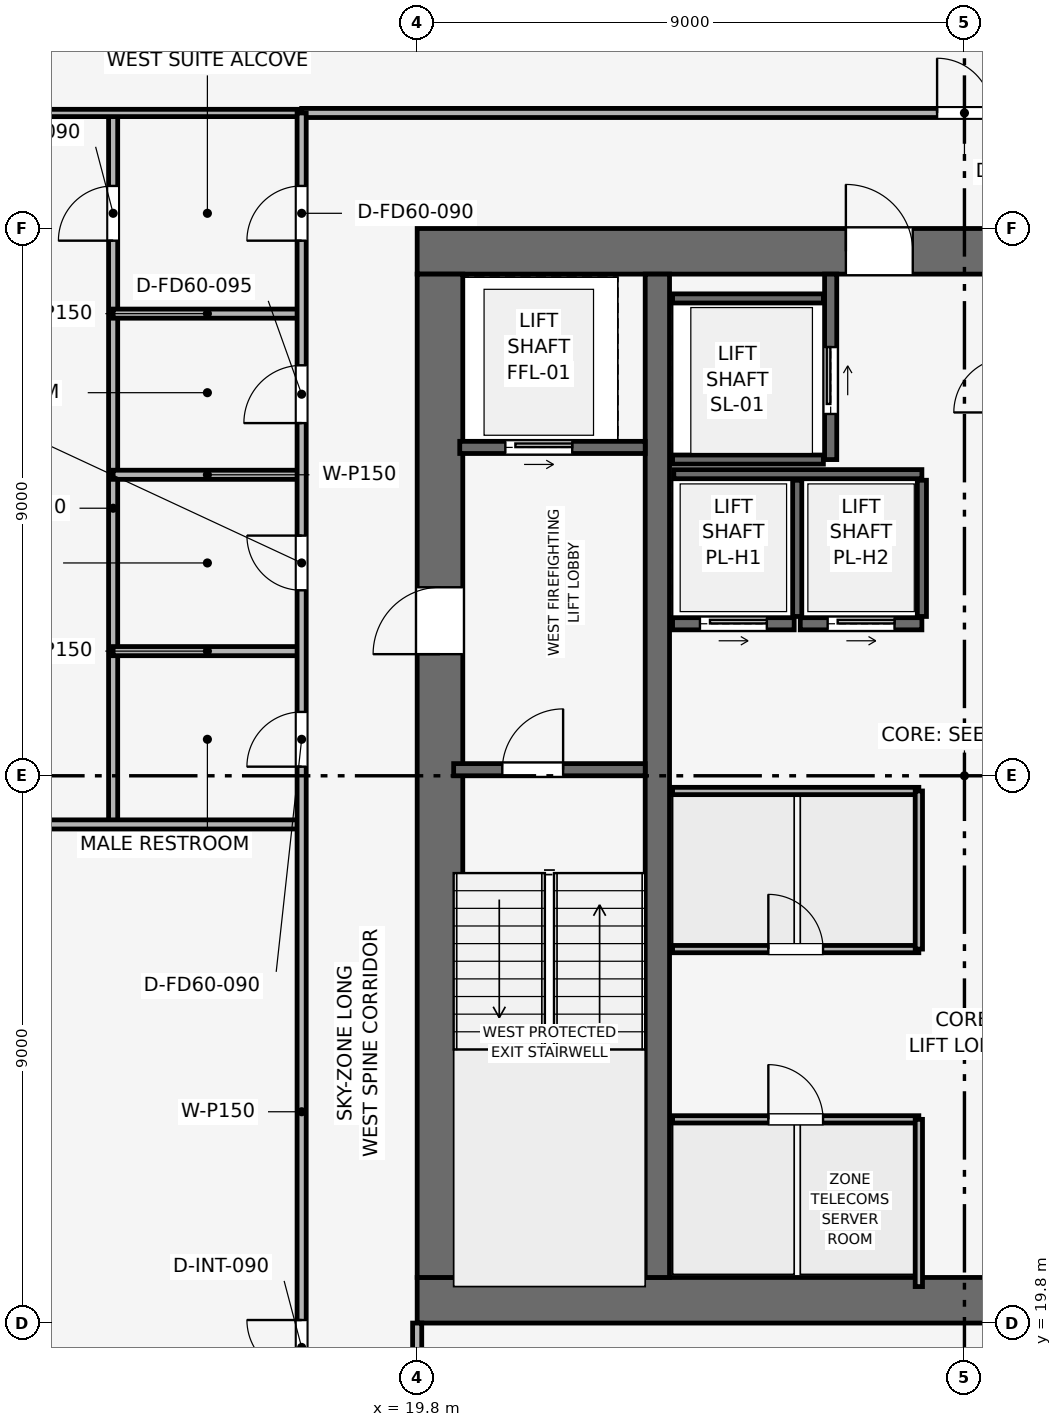
"""IFC4 building model, lengths in metres.
Left out: names, types, materials, properties, quantities, classifications, styles, units other than length and angle.
Written with IfcOpenShell. Run it as: python <this file> out.ifc"""

import sys

from ifc_helpers import new_model, si_unit, direction, frame, frame_2d, origin, place, context, subcontext, project, spatial, rectangle, extrude, element, fill, save


model = new_model("IFC4")
c1 = context("Model", 3, precision=1e-05, world=origin(), true_north=direction((0.0, 1.0)))
c2 = subcontext(c1, "Body", "Model", "MODEL_VIEW")
j1 = project(units=[si_unit("LENGTHUNIT", "METRE"), si_unit("PLANEANGLEUNIT", "RADIAN")], contexts=[c1])
p1 = place(None, origin())
s1 = spatial("IfcSite", under=j1, at=p1, CompositionType="ELEMENT")
p2 = place(p1, origin())
s2 = spatial("IfcBuilding", under=s1, at=p2, CompositionType="ELEMENT")
p3 = place(p2, frame((0.0, 0.0, 261.6)))
s3 = spatial("IfcBuildingStorey", under=s2, at=p3, CompositionType="ELEMENT", Elevation=261.6)
p4 = place(p3, frame((19.8, 20.175, 0.0), z_axis=(0.0, 0.0, 1.0), x_axis=(1.0, 0.0, 0.0)))
e1 = element("IfcWall", 1, at=p4, inside=s3, PredefinedType="SHEAR", context=c2, shape_type="SweptSolid", body=[
    extrude(rectangle(XDim=18.0, YDim=0.75, at=frame_2d((9.0, 0.0))), origin(), (0.0, 0.0, 1.0), 3.75),
])
p5 = place(p3, frame((19.8, 37.425, 0.0), z_axis=(0.0, 0.0, 1.0), x_axis=(1.0, 0.0, 0.0)))
e2 = element("IfcWall", 2, at=p5, inside=s3, PredefinedType="SHEAR", context=c2, shape_type="SweptSolid", body=[
    extrude(rectangle(XDim=18.0, YDim=0.75, at=frame_2d((9.0, 0.0))), origin(), (0.0, 0.0, 1.0), 3.75),
])
p6 = place(p5, frame((7.05, 0.0, 0.0)))
e3 = element("IfcOpeningElement", 3, at=p6, cuts=e2, PredefinedType="OPENING", context=c2, shape_type="SweptSolid", body=[
    extrude(rectangle(XDim=1.1, YDim=2.15, at=frame_2d((0.55, 1.075))), frame((0.0, 0.385, 0.0), z_axis=(0.0, -1.0, 0.0), x_axis=(1.0, 0.0, 0.0)), (0.0, 0.0, 1.0), 0.77),
])
p7 = place(p3, frame((20.175, 20.55, 0.0), z_axis=(0.0, 0.0, 1.0), x_axis=(0.0, 1.0, 0.0)))
e4 = element("IfcWall", 4, at=p7, inside=s3, PredefinedType="SHEAR", context=c2, shape_type="SweptSolid", body=[
    extrude(rectangle(XDim=16.5, YDim=0.75, at=frame_2d((8.25, 0.0))), origin(), (0.0, 0.0, 1.0), 3.75),
])
p8 = place(p7, frame((10.25, 0.0, 0.0)))
e5 = element("IfcOpeningElement", 5, at=p8, cuts=e4, PredefinedType="OPENING", context=c2, shape_type="SweptSolid", body=[
    extrude(rectangle(XDim=1.1, YDim=2.15, at=frame_2d((0.55, 1.075))), frame((0.0, 0.385, 0.0), z_axis=(0.0, -1.0, 0.0), x_axis=(1.0, 0.0, 0.0)), (0.0, 0.0, 1.0), 0.77),
])
p9 = place(p3, frame((23.75, 20.55, 0.0), z_axis=(0.0, 0.0, 1.0), x_axis=(0.0, 1.0, 0.0)))
e6 = element("IfcWall", 6, at=p9, inside=s3, PredefinedType="SHEAR", context=c2, shape_type="SweptSolid", body=[
    extrude(rectangle(XDim=16.5, YDim=0.4, at=frame_2d((8.25, 0.0))), origin(), (0.0, 0.0, 1.0), 3.75),
])
p10 = place(p3, frame((20.4, 28.9, 0.0), z_axis=(0.0, 0.0, 1.0), x_axis=(1.0, 0.0, 0.0)))
e7 = element("IfcWall", 7, at=p10, inside=s3, PredefinedType="SHEAR", context=c2, shape_type="SweptSolid", body=[
    extrude(rectangle(XDim=3.15, YDim=0.2, at=frame_2d((1.575, 0.0))), origin(), (0.0, 0.0, 1.0), 3.5),
])
p11 = place(p10, frame((0.8, 0.0, 0.0)))
e8 = element("IfcOpeningElement", 8, at=p11, cuts=e7, PredefinedType="OPENING", context=c2, shape_type="SweptSolid", body=[
    extrude(rectangle(XDim=1.0, YDim=2.1, at=frame_2d((0.5, 1.05))), frame((0.0, 0.11, 0.0), z_axis=(0.0, -1.0, 0.0), x_axis=(1.0, 0.0, 0.0)), (0.0, 0.0, 1.0), 0.22),
])
p12 = place(p3, frame((20.5, 34.2, 0.0), z_axis=(0.0, 0.0, 1.0), x_axis=(1.0, 0.0, 0.0)))
e9 = element("IfcWall", 9, at=p12, inside=s3, PredefinedType="SHEAR", context=c2, shape_type="SweptSolid", body=[
    extrude(rectangle(XDim=3.05, YDim=0.2, at=frame_2d((1.525, 0.0))), origin(), (0.0, 0.0, 1.0), 3.5),
])
p13 = place(p12, frame((0.75, 0.0, 0.0)))
e10 = element("IfcOpeningElement", 10, at=p13, cuts=e9, PredefinedType="OPENING", context=c2, shape_type="SweptSolid", body=[
    extrude(rectangle(XDim=1.1, YDim=2.15, at=frame_2d((0.55, 1.075))), frame((0.0, 0.11, 0.0), z_axis=(0.0, -1.0, 0.0), x_axis=(1.0, 0.0, 0.0)), (0.0, 0.0, 1.0), 0.22),
])
p14 = place(p3, frame((26.6, 34.0, 0.0), z_axis=(0.0, 0.0, 1.0), x_axis=(0.0, 1.0, 0.0)))
e11 = element("IfcWall", 11, at=p14, inside=s3, PredefinedType="SHEAR", context=c2, shape_type="SweptSolid", body=[
    extrude(rectangle(XDim=3.05, YDim=0.2, at=frame_2d((1.525, 0.0))), origin(), (0.0, 0.0, 1.0), 3.5),
])
p15 = place(p14, frame((0.75, 0.0, 0.0)))
e12 = element("IfcOpeningElement", 12, at=p15, cuts=e11, PredefinedType="OPENING", context=c2, shape_type="SweptSolid", body=[
    extrude(rectangle(XDim=1.1, YDim=2.15, at=frame_2d((0.55, 1.075))), frame((0.0, 0.11, 0.0), z_axis=(0.0, -1.0, 0.0), x_axis=(1.0, 0.0, 0.0)), (0.0, 0.0, 1.0), 0.22),
])
for number, where, z_axis, x_axis in (
    (13, (24.0, 34.0, 0.0), (0.0, 0.0, 1.0), (1.0, 0.0, 0.0)),
    (14, (24.0, 36.65, 0.0), (0.0, 0.0, 1.0), (1.0, 0.0, 0.0)),
):
    element("IfcWall", number, at=place(p3, frame(where, z_axis=z_axis, x_axis=x_axis)), inside=s3, PredefinedType="SHEAR", context=c2, shape_type="SweptSolid", body=[
        extrude(rectangle(XDim=2.48, YDim=0.15, at=frame_2d((1.24, 0.0))), origin(), (0.0, 0.0, 1.0), 3.5),
    ])
p16 = place(p3, frame((24.0, 31.3, 0.0), z_axis=(0.0, 0.0, 1.0), x_axis=(1.0, 0.0, 0.0)))
e15 = element("IfcWall", 15, at=p16, inside=s3, PredefinedType="SHEAR", context=c2, shape_type="SweptSolid", body=[
    extrude(rectangle(XDim=2.0, YDim=0.2, at=frame_2d((1.0, 0.0))), origin(), (0.0, 0.0, 1.0), 3.5),
])
p17 = place(p16, frame((0.45, 0.0, 0.0)))
e16 = element("IfcOpeningElement", 16, at=p17, cuts=e15, PredefinedType="OPENING", context=c2, shape_type="SweptSolid", body=[
    extrude(rectangle(XDim=1.1, YDim=2.15, at=frame_2d((0.55, 1.075))), frame((0.0, 0.11, 0.0), z_axis=(0.0, -1.0, 0.0), x_axis=(1.0, 0.0, 0.0)), (0.0, 0.0, 1.0), 0.22),
])
p18 = place(p3, frame((26.1, 31.3, 0.0), z_axis=(0.0, 0.0, 1.0), x_axis=(1.0, 0.0, 0.0)))
e17 = element("IfcWall", 17, at=p18, inside=s3, PredefinedType="SHEAR", context=c2, shape_type="SweptSolid", body=[
    extrude(rectangle(XDim=2.0, YDim=0.2, at=frame_2d((1.0, 0.0))), origin(), (0.0, 0.0, 1.0), 3.5),
])
p19 = place(p18, frame((0.45, 0.0, 0.0)))
e18 = element("IfcOpeningElement", 18, at=p19, cuts=e17, PredefinedType="OPENING", context=c2, shape_type="SweptSolid", body=[
    extrude(rectangle(XDim=1.1, YDim=2.15, at=frame_2d((0.55, 1.075))), frame((0.0, 0.11, 0.0), z_axis=(0.0, -1.0, 0.0), x_axis=(1.0, 0.0, 0.0)), (0.0, 0.0, 1.0), 0.22),
])
p20 = place(p3, frame((24.02, 33.76, 0.0), z_axis=(0.0, 0.0, 1.0), x_axis=(1.0, 0.0, 0.0)))
e19 = element("IfcWall", 19, at=p20, inside=s3, PredefinedType="SHEAR", context=c2, shape_type="SweptSolid", body=[
    extrude(rectangle(XDim=4.08, YDim=0.15, at=frame_2d((2.04, 0.0))), origin(), (0.0, 0.0, 1.0), 3.5),
])
for number, where, z_axis, x_axis in (
    (20, (26.05, 31.42, 0.0), (0.0, 0.0, 1.0), (0.0, 1.0, 0.0)),
    (21, (28.1, 31.42, 0.0), (0.0, 0.0, 1.0), (0.0, 1.0, 0.0)),
):
    element("IfcWall", number, at=place(p3, frame(where, z_axis=z_axis, x_axis=x_axis)), inside=s3, PredefinedType="SHEAR", context=c2, shape_type="SweptSolid", body=[
        extrude(rectangle(XDim=2.24, YDim=0.15, at=frame_2d((1.12, 0.0))), origin(), (0.0, 0.0, 1.0), 3.5),
    ])
p21 = place(p3, frame((24.0, 23.15, 0.0), z_axis=(0.0, 0.0, 1.0), x_axis=(1.0, 0.0, 0.0)))
e22 = element("IfcWall", 22, at=p21, inside=s3, PredefinedType="PARTITIONING", context=c2, shape_type="SweptSolid", body=[
    extrude(rectangle(XDim=4.05, YDim=0.12, at=frame_2d((2.025, 0.0))), origin(), (0.0, 0.0, 1.0), 3.5),
])
p22 = place(p21, frame((1.575, 0.0, 0.0)))
e23 = element("IfcOpeningElement", 23, at=p22, cuts=e22, PredefinedType="OPENING", context=c2, shape_type="SweptSolid", body=[
    extrude(rectangle(XDim=0.9, YDim=2.1, at=frame_2d((0.45, 1.05))), frame((0.0, 0.07, 0.0), z_axis=(0.0, -1.0, 0.0), x_axis=(1.0, 0.0, 0.0)), (0.0, 0.0, 1.0), 0.14),
])
p23 = place(p3, frame((28.05, 20.4, 0.0), z_axis=(0.0, 0.0, 1.0), x_axis=(0.0, 1.0, 0.0)))
e24 = element("IfcWall", 24, at=p23, inside=s3, PredefinedType="PARTITIONING", context=c2, shape_type="SweptSolid", body=[
    extrude(rectangle(XDim=2.75, YDim=0.12, at=frame_2d((1.375, 0.0))), origin(), (0.0, 0.0, 1.0), 3.5),
])
p24 = place(p3, frame((24.0, 25.95, 0.0), z_axis=(0.0, 0.0, 1.0), x_axis=(1.0, 0.0, 0.0)))
e25 = element("IfcWall", 25, at=p24, inside=s3, PredefinedType="PARTITIONING", context=c2, shape_type="SweptSolid", body=[
    extrude(rectangle(XDim=4.05, YDim=0.12, at=frame_2d((2.025, 0.0))), origin(), (0.0, 0.0, 1.0), 3.5),
])
p25 = place(p24, frame((1.575, 0.0, 0.0)))
e26 = element("IfcOpeningElement", 26, at=p25, cuts=e25, PredefinedType="OPENING", context=c2, shape_type="SweptSolid", body=[
    extrude(rectangle(XDim=0.9, YDim=2.1, at=frame_2d((0.45, 1.05))), frame((0.0, 0.07, 0.0), z_axis=(0.0, -1.0, 0.0), x_axis=(1.0, 0.0, 0.0)), (0.0, 0.0, 1.0), 0.14),
])
p26 = place(p3, frame((24.0, 28.55, 0.0), z_axis=(0.0, 0.0, 1.0), x_axis=(1.0, 0.0, 0.0)))
e27 = element("IfcWall", 27, at=p26, inside=s3, PredefinedType="PARTITIONING", context=c2, shape_type="SweptSolid", body=[
    extrude(rectangle(XDim=4.05, YDim=0.12, at=frame_2d((2.025, 0.0))), origin(), (0.0, 0.0, 1.0), 3.5),
])
p27 = place(p3, frame((28.05, 25.95, 0.0), z_axis=(0.0, 0.0, 1.0), x_axis=(0.0, 1.0, 0.0)))
e28 = element("IfcWall", 28, at=p27, inside=s3, PredefinedType="PARTITIONING", context=c2, shape_type="SweptSolid", body=[
    extrude(rectangle(XDim=2.6, YDim=0.12, at=frame_2d((1.3, 0.0))), origin(), (0.0, 0.0, 1.0), 3.5),
])
p28 = place(p3, frame((14.8, 28.0, 0.0), z_axis=(0.0, 0.0, 1.0), x_axis=(0.0, 1.0, 0.0)))
e29 = element("IfcWall", 29, at=p28, inside=s3, PredefinedType="PARTITIONING", context=c2, shape_type="SweptSolid", body=[
    extrude(rectangle(XDim=11.7, YDim=0.15, at=frame_2d((5.85, 0.0))), origin(), (0.0, 0.0, 1.0), 3.085),
])
p29 = place(p28, frame((9.6, 0.0, 0.0)))
e30 = element("IfcOpeningElement", 30, at=p29, cuts=e29, PredefinedType="OPENING", context=c2, shape_type="SweptSolid", body=[
    extrude(rectangle(XDim=0.9, YDim=2.1, at=frame_2d((0.45, 1.05))), frame((0.0, 0.085, 0.0), z_axis=(0.0, -1.0, 0.0), x_axis=(1.0, 0.0, 0.0)), (0.0, 0.0, 1.0), 0.17),
])
p30 = place(p3, frame((4.03, 28.0, 0.0), z_axis=(0.0, 0.0, 1.0), x_axis=(1.0, 0.0, 0.0)))
e31 = element("IfcWall", 31, at=p30, inside=s3, PredefinedType="PARTITIONING", context=c2, shape_type="SweptSolid", body=[
    extrude(rectangle(XDim=13.87, YDim=0.15, at=frame_2d((6.935, 0.0))), origin(), (0.0, 0.0, 1.0), 3.085),
])
for number, where, z_axis, x_axis in (
    (32, (14.8, 36.4, 0.0), (0.0, 0.0, 1.0), (1.0, 0.0, 0.0)),
    (33, (14.8, 30.85, 0.0), (0.0, 0.0, 1.0), (1.0, 0.0, 0.0)),
    (34, (14.8, 33.75, 0.0), (0.0, 0.0, 1.0), (1.0, 0.0, 0.0)),
):
    element("IfcWall", number, at=place(p3, frame(where, z_axis=z_axis, x_axis=x_axis)), inside=s3, PredefinedType="PARTITIONING", context=c2, shape_type="SweptSolid", body=[
        extrude(rectangle(XDim=3.1, YDim=0.15, at=frame_2d((1.55, 0.0))), origin(), (0.0, 0.0, 1.0), 3.5),
    ])
p31 = place(p3, frame((19.8, 4.03, 0.0), z_axis=(0.0, 0.0, 1.0), x_axis=(0.0, 1.0, 0.0)))
e35 = element("IfcWall", 35, at=p31, inside=s3, PredefinedType="PARTITIONING", context=c2, shape_type="SweptSolid", body=[
    extrude(rectangle(XDim=15.77, YDim=0.15, at=frame_2d((7.885, 0.0))), origin(), (0.0, 0.0, 1.0), 3.085),
])
p32 = place(p31, frame((10.82, 0.0, 0.0)))
e36 = element("IfcOpeningElement", 36, at=p32, cuts=e35, PredefinedType="OPENING", context=c2, shape_type="SweptSolid", body=[
    extrude(rectangle(XDim=0.9, YDim=2.1, at=frame_2d((0.45, 1.05))), frame((0.0, 0.085, 0.0), z_axis=(0.0, -1.0, 0.0), x_axis=(1.0, 0.0, 0.0)), (0.0, 0.0, 1.0), 0.17),
])
p33 = place(p3, frame((4.03, 39.7, 0.0), z_axis=(0.0, 0.0, 1.0), x_axis=(1.0, 0.0, 0.0)))
e37 = element("IfcWall", 37, at=p33, inside=s3, PredefinedType="PARTITIONING", context=c2, shape_type="SweptSolid", body=[
    extrude(rectangle(XDim=13.87, YDim=0.12, at=frame_2d((6.935, 0.0))), origin(), (0.0, 0.0, 1.0), 3.085),
])
p34 = place(p3, frame((17.9, 39.7, 0.0), z_axis=(0.0, 0.0, 1.0), x_axis=(1.0, 0.0, 0.0)))
e38 = element("IfcWall", 38, at=p34, inside=s3, PredefinedType="PARTITIONING", context=c2, shape_type="SweptSolid", body=[
    extrude(rectangle(XDim=21.8, YDim=0.15, at=frame_2d((10.9, 0.0))), origin(), (0.0, 0.0, 1.0), 3.085),
])
p35 = place(p34, frame((10.45, 0.0, 0.0)))
e39 = element("IfcOpeningElement", 39, at=p35, cuts=e38, PredefinedType="OPENING", context=c2, shape_type="SweptSolid", body=[
    extrude(rectangle(XDim=0.9, YDim=2.1, at=frame_2d((0.45, 1.05))), frame((0.0, 0.085, 0.0), z_axis=(0.0, -1.0, 0.0), x_axis=(1.0, 0.0, 0.0)), (0.0, 0.0, 1.0), 0.17),
])
p36 = place(p3, frame((17.9, 10.8, 0.0), z_axis=(0.0, 0.0, 1.0), x_axis=(0.0, 1.0, 0.0)))
e40 = element("IfcWall", 40, at=p36, inside=s3, PredefinedType="PARTITIONING", context=c2, shape_type="SweptSolid", body=[
    extrude(rectangle(XDim=28.9, YDim=0.15, at=frame_2d((14.45, 0.0))), origin(), (0.0, 0.0, 1.0), 3.085),
])
p37 = place(p36, frame((8.15, 0.0, 0.0)))
e41 = element("IfcOpeningElement", 41, at=p37, cuts=e40, PredefinedType="OPENING", context=c2, shape_type="SweptSolid", body=[
    extrude(rectangle(XDim=0.9, YDim=2.1, at=frame_2d((0.45, 1.05))), frame((0.0, 0.085, 0.0), z_axis=(0.0, -1.0, 0.0), x_axis=(1.0, 0.0, 0.0)), (0.0, 0.0, 1.0), 0.17),
])
p38 = place(p36, frame((18.15, 0.0, 0.0)))
e42 = element("IfcOpeningElement", 42, at=p38, cuts=e40, PredefinedType="OPENING", context=c2, shape_type="SweptSolid", body=[
    extrude(rectangle(XDim=0.9, YDim=2.1, at=frame_2d((0.45, 1.05))), frame((0.0, 0.085, 0.0), z_axis=(0.0, -1.0, 0.0), x_axis=(1.0, 0.0, 0.0)), (0.0, 0.0, 1.0), 0.17),
])
p39 = place(p36, frame((21.05, 0.0, 0.0)))
e43 = element("IfcOpeningElement", 43, at=p39, cuts=e40, PredefinedType="OPENING", context=c2, shape_type="SweptSolid", body=[
    extrude(rectangle(XDim=0.9, YDim=2.1, at=frame_2d((0.45, 1.05))), frame((0.0, 0.085, 0.0), z_axis=(0.0, -1.0, 0.0), x_axis=(1.0, 0.0, 0.0)), (0.0, 0.0, 1.0), 0.17),
])
p40 = place(p36, frame((23.8, 0.0, 0.0)))
e44 = element("IfcOpeningElement", 44, at=p40, cuts=e40, PredefinedType="OPENING", context=c2, shape_type="SweptSolid", body=[
    extrude(rectangle(XDim=0.95, YDim=2.1, at=frame_2d((0.475, 1.05))), frame((0.0, 0.085, 0.0), z_axis=(0.0, -1.0, 0.0), x_axis=(1.0, 0.0, 0.0)), (0.0, 0.0, 1.0), 0.17),
])
p41 = place(p36, frame((26.8, 0.0, 0.0)))
e45 = element("IfcOpeningElement", 45, at=p41, cuts=e40, PredefinedType="OPENING", context=c2, shape_type="SweptSolid", body=[
    extrude(rectangle(XDim=0.9, YDim=2.1, at=frame_2d((0.45, 1.05))), frame((0.0, 0.085, 0.0), z_axis=(0.0, -1.0, 0.0), x_axis=(1.0, 0.0, 0.0)), (0.0, 0.0, 1.0), 0.17),
])
p42 = place(p11, origin())
e46 = element("IfcDoor", 46, at=p42, inside=s3, OperationType="SINGLE_SWING_RIGHT", PredefinedType="DOOR", context=c2, shape_type="SweptSolid", body=[
    extrude(rectangle(XDim=1.0, YDim=2.1, at=frame_2d((0.5, 1.05))), frame((0.0, 0.025, 0.0), z_axis=(0.0, -1.0, 0.0), x_axis=(1.0, 0.0, 0.0)), (0.0, 0.0, 1.0), 0.05),
])
fill(e8, e46)
p43 = place(p13, origin())
e47 = element("IfcDoor", 47, at=p43, inside=s3, OperationType="SLIDING_TO_RIGHT", PredefinedType="DOOR", context=c2, shape_type="SweptSolid", body=[
    extrude(rectangle(XDim=1.1, YDim=2.15, at=frame_2d((0.55, 1.075))), frame((0.0, 0.025, 0.0), z_axis=(0.0, -1.0, 0.0), x_axis=(1.0, 0.0, 0.0)), (0.0, 0.0, 1.0), 0.05),
])
fill(e10, e47)
p44 = place(p15, origin())
e48 = element("IfcDoor", 48, at=p44, inside=s3, OperationType="SLIDING_TO_RIGHT", PredefinedType="DOOR", context=c2, shape_type="SweptSolid", body=[
    extrude(rectangle(XDim=1.1, YDim=2.15, at=frame_2d((0.55, 1.075))), frame((0.0, 0.025, 0.0), z_axis=(0.0, -1.0, 0.0), x_axis=(1.0, 0.0, 0.0)), (0.0, 0.0, 1.0), 0.05),
])
fill(e12, e48)
p45 = place(p17, origin())
e49 = element("IfcDoor", 49, at=p45, inside=s3, OperationType="SLIDING_TO_RIGHT", PredefinedType="DOOR", context=c2, shape_type="SweptSolid", body=[
    extrude(rectangle(XDim=1.1, YDim=2.15, at=frame_2d((0.55, 1.075))), frame((0.0, 0.025, 0.0), z_axis=(0.0, -1.0, 0.0), x_axis=(1.0, 0.0, 0.0)), (0.0, 0.0, 1.0), 0.05),
])
fill(e16, e49)
p46 = place(p19, origin())
e50 = element("IfcDoor", 50, at=p46, inside=s3, OperationType="SLIDING_TO_RIGHT", PredefinedType="DOOR", context=c2, shape_type="SweptSolid", body=[
    extrude(rectangle(XDim=1.1, YDim=2.15, at=frame_2d((0.55, 1.075))), frame((0.0, 0.025, 0.0), z_axis=(0.0, -1.0, 0.0), x_axis=(1.0, 0.0, 0.0)), (0.0, 0.0, 1.0), 0.05),
])
fill(e18, e50)
p47 = place(p22, origin())
e51 = element("IfcDoor", 51, at=p47, inside=s3, OperationType="SINGLE_SWING_LEFT", PredefinedType="DOOR", context=c2, shape_type="SweptSolid", body=[
    extrude(rectangle(XDim=0.9, YDim=2.1, at=frame_2d((0.45, 1.05))), frame((0.0, 0.025, 0.0), z_axis=(0.0, -1.0, 0.0), x_axis=(1.0, 0.0, 0.0)), (0.0, 0.0, 1.0), 0.05),
])
fill(e23, e51)
p48 = place(p25, origin())
e52 = element("IfcDoor", 52, at=p48, inside=s3, OperationType="SINGLE_SWING_LEFT", PredefinedType="DOOR", context=c2, shape_type="SweptSolid", body=[
    extrude(rectangle(XDim=0.9, YDim=2.1, at=frame_2d((0.45, 1.05))), frame((0.0, 0.025, 0.0), z_axis=(0.0, -1.0, 0.0), x_axis=(1.0, 0.0, 0.0)), (0.0, 0.0, 1.0), 0.05),
])
fill(e26, e52)
p49 = place(p29, origin())
e53 = element("IfcDoor", 53, at=p49, inside=s3, OperationType="SINGLE_SWING_LEFT", PredefinedType="DOOR", context=c2, shape_type="SweptSolid", body=[
    extrude(rectangle(XDim=0.9, YDim=2.1, at=frame_2d((0.45, 1.05))), frame((0.0, 0.025, 0.0), z_axis=(0.0, -1.0, 0.0), x_axis=(1.0, 0.0, 0.0)), (0.0, 0.0, 1.0), 0.05),
])
fill(e30, e53)
p50 = place(p35, origin())
e54 = element("IfcDoor", 54, at=p50, inside=s3, OperationType="SINGLE_SWING_LEFT", PredefinedType="DOOR", context=c2, shape_type="SweptSolid", body=[
    extrude(rectangle(XDim=0.9, YDim=2.1, at=frame_2d((0.45, 1.05))), frame((0.0, 0.025, 0.0), z_axis=(0.0, -1.0, 0.0), x_axis=(1.0, 0.0, 0.0)), (0.0, 0.0, 1.0), 0.05),
])
fill(e39, e54)
p51 = place(p37, origin())
e55 = element("IfcDoor", 55, at=p51, inside=s3, OperationType="SINGLE_SWING_RIGHT", PredefinedType="DOOR", context=c2, shape_type="SweptSolid", body=[
    extrude(rectangle(XDim=0.9, YDim=2.1, at=frame_2d((0.45, 1.05))), frame((0.0, 0.025, 0.0), z_axis=(0.0, -1.0, 0.0), x_axis=(1.0, 0.0, 0.0)), (0.0, 0.0, 1.0), 0.05),
])
fill(e41, e55)
p52 = place(p38, origin())
e56 = element("IfcDoor", 56, at=p52, inside=s3, OperationType="SINGLE_SWING_LEFT", PredefinedType="DOOR", context=c2, shape_type="SweptSolid", body=[
    extrude(rectangle(XDim=0.9, YDim=2.1, at=frame_2d((0.45, 1.05))), frame((0.0, 0.025, 0.0), z_axis=(0.0, -1.0, 0.0), x_axis=(1.0, 0.0, 0.0)), (0.0, 0.0, 1.0), 0.05),
])
fill(e42, e56)
p53 = place(p39, origin())
e57 = element("IfcDoor", 57, at=p53, inside=s3, OperationType="SINGLE_SWING_RIGHT", PredefinedType="DOOR", context=c2, shape_type="SweptSolid", body=[
    extrude(rectangle(XDim=0.9, YDim=2.1, at=frame_2d((0.45, 1.05))), frame((0.0, 0.025, 0.0), z_axis=(0.0, -1.0, 0.0), x_axis=(1.0, 0.0, 0.0)), (0.0, 0.0, 1.0), 0.05),
])
fill(e43, e57)
p54 = place(p40, origin())
e58 = element("IfcDoor", 58, at=p54, inside=s3, OperationType="SINGLE_SWING_LEFT", PredefinedType="DOOR", context=c2, shape_type="SweptSolid", body=[
    extrude(rectangle(XDim=0.95, YDim=2.1, at=frame_2d((0.475, 1.05))), frame((0.0, 0.025, 0.0), z_axis=(0.0, -1.0, 0.0), x_axis=(1.0, 0.0, 0.0)), (0.0, 0.0, 1.0), 0.05),
])
fill(e44, e58)
p55 = place(p41, origin())
e59 = element("IfcDoor", 59, at=p55, inside=s3, OperationType="SINGLE_SWING_LEFT", PredefinedType="DOOR", context=c2, shape_type="SweptSolid", body=[
    extrude(rectangle(XDim=0.9, YDim=2.1, at=frame_2d((0.45, 1.05))), frame((0.0, 0.025, 0.0), z_axis=(0.0, -1.0, 0.0), x_axis=(1.0, 0.0, 0.0)), (0.0, 0.0, 1.0), 0.05),
])
fill(e45, e59)
p56 = place(p8, origin())
e60 = element("IfcDoor", 60, at=p56, inside=s3, OperationType="SINGLE_SWING_LEFT", PredefinedType="DOOR", context=c2, shape_type="SweptSolid", body=[
    extrude(rectangle(XDim=1.1, YDim=2.15, at=frame_2d((0.55, 1.075))), frame((0.0, 0.025, 0.0), z_axis=(0.0, -1.0, 0.0), x_axis=(1.0, 0.0, 0.0)), (0.0, 0.0, 1.0), 0.05),
])
fill(e5, e60)
p57 = place(p6, origin())
e61 = element("IfcDoor", 61, at=p57, inside=s3, OperationType="SINGLE_SWING_LEFT", PredefinedType="DOOR", context=c2, shape_type="SweptSolid", body=[
    extrude(rectangle(XDim=1.1, YDim=2.15, at=frame_2d((0.55, 1.075))), frame((0.0, 0.025, 0.0), z_axis=(0.0, -1.0, 0.0), x_axis=(1.0, 0.0, 0.0)), (0.0, 0.0, 1.0), 0.05),
])
fill(e3, e61)
save(model, sys.argv[1])
